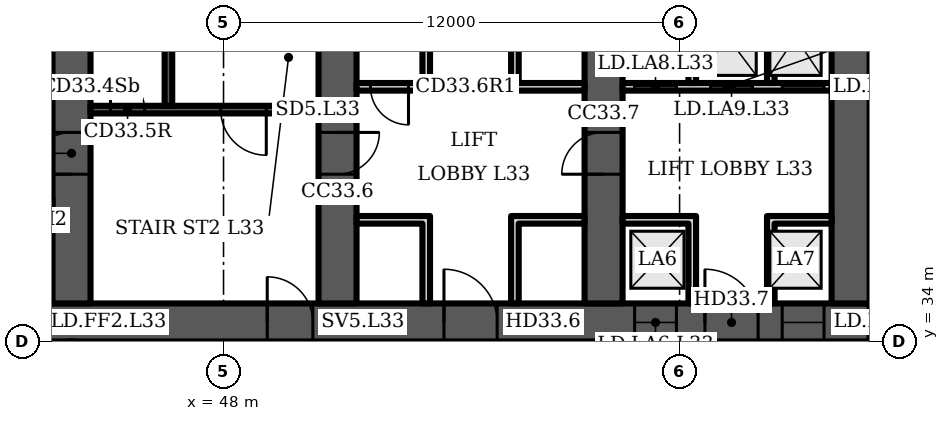
"""IFC4 building model, lengths in metres.
Left out: names, types, materials, properties, quantities, classifications, styles, units other than length and angle.
Written with IfcOpenShell. Run it as: python <this file> out.ifc"""

import sys

from ifc_helpers import new_model, si_unit, direction, frame, frame_2d, origin, place, context, subcontext, project, spatial, polyline, rectangle, outline, extrude, element, fill, save


model = new_model("IFC4")
c1 = context("Model", 3, precision=1e-05, world=origin(), true_north=direction((0.0, 1.0)))
c2 = subcontext(c1, "Body", "Model", "MODEL_VIEW")
j1 = project(units=[si_unit("LENGTHUNIT", "METRE"), si_unit("PLANEANGLEUNIT", "RADIAN")], contexts=[c1])
p1 = place(None, origin())
s1 = spatial("IfcSite", under=j1, at=p1, CompositionType="ELEMENT")
p2 = place(p1, origin())
s2 = spatial("IfcBuilding", under=s1, at=p2, CompositionType="ELEMENT")
p3 = place(p2, frame((0.0, 0.0, 139.9)))
s3 = spatial("IfcBuildingStorey", under=s2, at=p3, CompositionType="ELEMENT", Elevation=139.9)
p4 = place(p3, frame((16.0, 34.5, 0.0), z_axis=(0.0, 0.0, 1.0), x_axis=(1.0, 0.0, 0.0)))
e1 = element("IfcWall", 1, at=p4, inside=s3, PredefinedType="SHEAR", context=c2, shape_type="SweptSolid", body=[
    extrude(rectangle(XDim=49.0, YDim=1.0, at=frame_2d((24.5, 0.0))), origin(), (0.0, 0.0, 1.0), 3.6),
])
p5 = place(p4, frame((1.2, 0.0, 0.0)))
e2 = element("IfcOpeningElement", 2, at=p5, cuts=e1, PredefinedType="OPENING", context=c2, shape_type="SweptSolid", body=[
    extrude(rectangle(XDim=1.1, YDim=2.1, at=frame_2d((0.55, 1.05))), frame((0.0, 0.51, 0.0), z_axis=(0.0, -1.0, 0.0), x_axis=(1.0, 0.0, 0.0)), (0.0, 0.0, 1.0), 1.02),
])
p6 = place(p4, frame((5.083, 0.0, 0.0)))
e3 = element("IfcOpeningElement", 3, at=p6, cuts=e1, PredefinedType="OPENING", context=c2, shape_type="SweptSolid", body=[
    extrude(rectangle(XDim=1.1, YDim=2.1, at=frame_2d((0.55, 1.05))), frame((0.0, 0.51, 0.0), z_axis=(0.0, -1.0, 0.0), x_axis=(1.0, 0.0, 0.0)), (0.0, 0.0, 1.0), 1.02),
])
p7 = place(p4, frame((2.933, 0.0, 0.0)))
e4 = element("IfcOpeningElement", 4, at=p7, cuts=e1, PredefinedType="OPENING", context=c2, shape_type="SweptSolid", body=[
    extrude(rectangle(XDim=1.4, YDim=2.1, at=frame_2d((0.7, 1.05))), frame((0.0, 0.51, 0.0), z_axis=(0.0, -1.0, 0.0), x_axis=(1.0, 0.0, 0.0)), (0.0, 0.0, 1.0), 1.02),
])
p8 = place(p4, frame((7.65, 0.0, 0.0)))
e5 = element("IfcOpeningElement", 5, at=p8, cuts=e1, PredefinedType="OPENING", context=c2, shape_type="SweptSolid", body=[
    extrude(rectangle(XDim=1.2, YDim=2.1, at=frame_2d((0.6, 1.05))), frame((0.0, 0.51, 0.0), z_axis=(0.0, -1.0, 0.0), x_axis=(1.0, 0.0, 0.0)), (0.0, 0.0, 1.0), 1.02),
])
p9 = place(p4, frame((14.817, 0.0, 0.0)))
e6 = element("IfcOpeningElement", 6, at=p9, cuts=e1, PredefinedType="OPENING", context=c2, shape_type="SweptSolid", body=[
    extrude(rectangle(XDim=1.1, YDim=2.1, at=frame_2d((0.55, 1.05))), frame((0.0, 0.51, 0.0), z_axis=(0.0, -1.0, 0.0), x_axis=(1.0, 0.0, 0.0)), (0.0, 0.0, 1.0), 1.02),
])
p10 = place(p4, frame((19.083, 0.0, 0.0)))
e7 = element("IfcOpeningElement", 7, at=p10, cuts=e1, PredefinedType="OPENING", context=c2, shape_type="SweptSolid", body=[
    extrude(rectangle(XDim=1.1, YDim=2.1, at=frame_2d((0.55, 1.05))), frame((0.0, 0.51, 0.0), z_axis=(0.0, -1.0, 0.0), x_axis=(1.0, 0.0, 0.0)), (0.0, 0.0, 1.0), 1.02),
])
p11 = place(p4, frame((16.8, 0.0, 0.0)))
e8 = element("IfcOpeningElement", 8, at=p11, cuts=e1, PredefinedType="OPENING", context=c2, shape_type="SweptSolid", body=[
    extrude(rectangle(XDim=1.4, YDim=2.1, at=frame_2d((0.7, 1.05))), frame((0.0, 0.51, 0.0), z_axis=(0.0, -1.0, 0.0), x_axis=(1.0, 0.0, 0.0)), (0.0, 0.0, 1.0), 1.02),
])
p12 = place(p4, frame((21.817, 0.0, 0.0)))
e9 = element("IfcOpeningElement", 9, at=p12, cuts=e1, PredefinedType="OPENING", context=c2, shape_type="SweptSolid", body=[
    extrude(rectangle(XDim=1.1, YDim=2.1, at=frame_2d((0.55, 1.05))), frame((0.0, 0.51, 0.0), z_axis=(0.0, -1.0, 0.0), x_axis=(1.0, 0.0, 0.0)), (0.0, 0.0, 1.0), 1.02),
])
p13 = place(p4, frame((26.083, 0.0, 0.0)))
e10 = element("IfcOpeningElement", 10, at=p13, cuts=e1, PredefinedType="OPENING", context=c2, shape_type="SweptSolid", body=[
    extrude(rectangle(XDim=1.1, YDim=2.1, at=frame_2d((0.55, 1.05))), frame((0.0, 0.51, 0.0), z_axis=(0.0, -1.0, 0.0), x_axis=(1.0, 0.0, 0.0)), (0.0, 0.0, 1.0), 1.02),
])
p14 = place(p4, frame((33.15, 0.0, 0.0)))
e11 = element("IfcOpeningElement", 11, at=p14, cuts=e1, PredefinedType="OPENING", context=c2, shape_type="SweptSolid", body=[
    extrude(rectangle(XDim=1.2, YDim=2.1, at=frame_2d((0.6, 1.05))), frame((0.0, 0.51, 0.0), z_axis=(0.0, -1.0, 0.0), x_axis=(1.0, 0.0, 0.0)), (0.0, 0.0, 1.0), 1.02),
])
p15 = place(p4, frame((37.8, 0.0, 0.0)))
e12 = element("IfcOpeningElement", 12, at=p15, cuts=e1, PredefinedType="OPENING", context=c2, shape_type="SweptSolid", body=[
    extrude(rectangle(XDim=1.4, YDim=2.1, at=frame_2d((0.7, 1.05))), frame((0.0, 0.51, 0.0), z_axis=(0.0, -1.0, 0.0), x_axis=(1.0, 0.0, 0.0)), (0.0, 0.0, 1.0), 1.02),
])
p16 = place(p4, frame((42.817, 0.0, 0.0)))
e13 = element("IfcOpeningElement", 13, at=p16, cuts=e1, PredefinedType="OPENING", context=c2, shape_type="SweptSolid", body=[
    extrude(rectangle(XDim=1.1, YDim=2.1, at=frame_2d((0.55, 1.05))), frame((0.0, 0.51, 0.0), z_axis=(0.0, -1.0, 0.0), x_axis=(1.0, 0.0, 0.0)), (0.0, 0.0, 1.0), 1.02),
])
p17 = place(p4, frame((46.7, 0.0, 0.0)))
e14 = element("IfcOpeningElement", 14, at=p17, cuts=e1, PredefinedType="OPENING", context=c2, shape_type="SweptSolid", body=[
    extrude(rectangle(XDim=1.1, YDim=2.1, at=frame_2d((0.55, 1.05))), frame((0.0, 0.51, 0.0), z_axis=(0.0, -1.0, 0.0), x_axis=(1.0, 0.0, 0.0)), (0.0, 0.0, 1.0), 1.02),
])
p18 = place(p4, frame((44.667, 0.0, 0.0)))
e15 = element("IfcOpeningElement", 15, at=p18, cuts=e1, PredefinedType="OPENING", context=c2, shape_type="SweptSolid", body=[
    extrude(rectangle(XDim=1.4, YDim=2.1, at=frame_2d((0.7, 1.05))), frame((0.0, 0.51, 0.0), z_axis=(0.0, -1.0, 0.0), x_axis=(1.0, 0.0, 0.0)), (0.0, 0.0, 1.0), 1.02),
])
p19 = place(p3, frame((44.0, 35.0, 0.0), z_axis=(0.0, 0.0, 1.0), x_axis=(0.0, 1.0, 0.0)))
e16 = element("IfcWall", 16, at=p19, inside=s3, PredefinedType="SHEAR", context=c2, shape_type="SweptSolid", body=[
    extrude(rectangle(XDim=14.577, YDim=1.0, at=frame_2d((7.289, 0.0))), origin(), (0.0, 0.0, 1.0), 3.6),
])
p20 = place(p19, frame((3.4, 0.0, 0.0)))
e17 = element("IfcOpeningElement", 17, at=p20, cuts=e16, PredefinedType="OPENING", context=c2, shape_type="SweptSolid", body=[
    extrude(rectangle(XDim=1.1, YDim=2.1, at=frame_2d((0.55, 1.05))), frame((0.0, 0.51, 0.0), z_axis=(0.0, -1.0, 0.0), x_axis=(1.0, 0.0, 0.0)), (0.0, 0.0, 1.0), 1.02),
])
p21 = place(p19, frame((9.8, 0.0, 0.0)))
e18 = element("IfcOpeningElement", 18, at=p21, cuts=e16, PredefinedType="OPENING", context=c2, shape_type="SweptSolid", body=[
    extrude(rectangle(XDim=1.0, YDim=2.1, at=frame_2d((0.5, 1.05))), frame((0.0, 0.51, 0.0), z_axis=(0.0, -1.0, 0.0), x_axis=(1.0, 0.0, 0.0)), (0.0, 0.0, 1.0), 1.02),
])
p22 = place(p3, frame((51.0, 35.0, 0.0), z_axis=(0.0, 0.0, 1.0), x_axis=(0.0, 1.0, 0.0)))
e19 = element("IfcWall", 19, at=p22, inside=s3, PredefinedType="SHEAR", context=c2, shape_type="SweptSolid", body=[
    extrude(rectangle(XDim=13.965, YDim=1.0, at=frame_2d((6.982, 0.0))), origin(), (0.0, 0.0, 1.0), 3.6),
])
p23 = place(p22, frame((3.4, 0.0, 0.0)))
e20 = element("IfcOpeningElement", 20, at=p23, cuts=e19, PredefinedType="OPENING", context=c2, shape_type="SweptSolid", body=[
    extrude(rectangle(XDim=1.1, YDim=2.1, at=frame_2d((0.55, 1.05))), frame((0.0, 0.51, 0.0), z_axis=(0.0, -1.0, 0.0), x_axis=(1.0, 0.0, 0.0)), (0.0, 0.0, 1.0), 1.02),
])
p24 = place(p3, frame((58.0, 35.0, 0.0), z_axis=(0.0, 0.0, 1.0), x_axis=(0.0, 1.0, 0.0)))
e21 = element("IfcWall", 21, at=p24, inside=s3, PredefinedType="SHEAR", context=c2, shape_type="SweptSolid", body=[
    extrude(rectangle(XDim=13.352, YDim=1.0, at=frame_2d((6.676, 0.0))), origin(), (0.0, 0.0, 1.0), 3.6),
])
p25 = place(p24, frame((10.426, 0.0, 0.0)))
e22 = element("IfcOpeningElement", 22, at=p25, cuts=e21, PredefinedType="OPENING", context=c2, shape_type="SweptSolid", body=[
    extrude(rectangle(XDim=1.0, YDim=2.1, at=frame_2d((0.5, 1.05))), frame((0.0, 0.51, 0.0), z_axis=(0.0, -1.0, 0.0), x_axis=(1.0, 0.0, 0.0)), (0.0, 0.0, 1.0), 1.02),
])
p26 = place(p24, frame((3.4, 0.0, 0.0)))
e23 = element("IfcOpeningElement", 23, at=p26, cuts=e21, PredefinedType="OPENING", context=c2, shape_type="SweptSolid", body=[
    extrude(rectangle(XDim=1.1, YDim=2.1, at=frame_2d((0.55, 1.05))), frame((0.0, 0.51, 0.0), z_axis=(0.0, -1.0, 0.0), x_axis=(1.0, 0.0, 0.0)), (0.0, 0.0, 1.0), 1.02),
])
p27 = place(p3, frame((64.5, 35.0, 0.0), z_axis=(0.0, 0.0, 1.0), x_axis=(0.0, 1.0, 0.0)))
e24 = element("IfcWall", 24, at=p27, inside=s3, PredefinedType="SHEAR", context=c2, shape_type="SweptSolid", body=[
    extrude(rectangle(XDim=12.784, YDim=1.0, at=frame_2d((6.392, 0.0))), origin(), (0.0, 0.0, 1.0), 3.6),
])
p28 = place(p3, frame((44.5, 40.1, 0.0), z_axis=(0.0, 0.0, 1.0), x_axis=(1.0, 0.0, 0.0)))
e25 = element("IfcWall", 25, at=p28, inside=s3, PredefinedType="SHEAR", context=c2, shape_type="SweptSolid", body=[
    extrude(rectangle(XDim=6.0, YDim=0.2, at=frame_2d((3.0, 0.0))), origin(), (0.0, 0.0, 1.0), 3.2),
])
p29 = place(p28, frame((3.425, 0.0, 0.0)))
e26 = element("IfcOpeningElement", 26, at=p29, cuts=e25, PredefinedType="OPENING", context=c2, shape_type="SweptSolid", body=[
    extrude(rectangle(XDim=1.2, YDim=2.1, at=frame_2d((0.6, 1.05))), frame((0.0, 0.11, 0.0), z_axis=(0.0, -1.0, 0.0), x_axis=(1.0, 0.0, 0.0)), (0.0, 0.0, 1.0), 0.22),
])
p30 = place(p28, frame((0.525, 0.0, 0.0)))
e27 = element("IfcOpeningElement", 27, at=p30, cuts=e25, PredefinedType="OPENING", context=c2, shape_type="SweptSolid", body=[
    extrude(rectangle(XDim=0.9, YDim=2.1, at=frame_2d((0.45, 1.05))), frame((0.0, 0.11, 0.0), z_axis=(0.0, -1.0, 0.0), x_axis=(1.0, 0.0, 0.0)), (0.0, 0.0, 1.0), 0.22),
])
p31 = place(p3, frame((46.55, 40.2, 0.0), z_axis=(0.0, 0.0, 1.0), x_axis=(0.0, 1.0, 0.0)))
e28 = element("IfcWall", 28, at=p31, inside=s3, PredefinedType="SHEAR", context=c2, shape_type="SweptSolid", body=[
    extrude(rectangle(XDim=7.2, YDim=0.2, at=frame_2d((3.6, 0.0))), origin(), (0.0, 0.0, 1.0), 3.2),
])
p32 = place(p3, frame((51.5, 40.7, 0.0), z_axis=(0.0, 0.0, 1.0), x_axis=(1.0, 0.0, 0.0)))
e29 = element("IfcWall", 29, at=p32, inside=s3, PredefinedType="PARTITIONING", context=c2, shape_type="SweptSolid", body=[
    extrude(rectangle(XDim=6.0, YDim=0.2, at=frame_2d((3.0, 0.0))), origin(), (0.0, 0.0, 1.0), 3.2),
])
p33 = place(p32, frame((0.367, 0.0, 0.0)))
e30 = element("IfcOpeningElement", 30, at=p33, cuts=e29, PredefinedType="OPENING", context=c2, shape_type="SweptSolid", body=[
    extrude(rectangle(XDim=1.0, YDim=2.1, at=frame_2d((0.5, 1.05))), frame((0.0, 0.11, 0.0), z_axis=(0.0, -1.0, 0.0), x_axis=(1.0, 0.0, 0.0)), (0.0, 0.0, 1.0), 0.22),
])
p34 = place(p3, origin())
e31 = element("IfcWall", 31, at=p34, inside=s3, PredefinedType="PARTITIONING", context=c2, shape_type="SweptSolid", body=[
    extrude(outline(polyline([(53.233, 37.1), (51.5, 37.1), (51.5, 37.3), (53.233, 37.3), (53.433, 37.3), (53.433, 35.0), (53.233, 35.0), (53.233, 37.1)])), origin(), (0.0, 0.0, 1.0), 3.2),
])
p35 = place(p3, origin())
e32 = element("IfcWall", 32, at=p35, inside=s3, PredefinedType="PARTITIONING", context=c2, shape_type="SweptSolid", body=[
    extrude(outline(polyline([(55.567, 37.3), (55.767, 37.3), (57.5, 37.3), (57.5, 37.1), (55.767, 37.1), (55.767, 35.0), (55.567, 35.0), (55.567, 37.3)])), origin(), (0.0, 0.0, 1.0), 3.2),
])
p36 = place(p3, origin())
e33 = element("IfcWall", 33, at=p36, inside=s3, PredefinedType="PARTITIONING", context=c2, shape_type="SweptSolid", body=[
    extrude(outline(polyline([(53.233, 40.8), (53.233, 43.8), (53.433, 43.8), (53.433, 40.8), (53.233, 40.8)])), origin(), (0.0, 0.0, 1.0), 3.2),
])
p37 = place(p3, origin())
e34 = element("IfcWall", 34, at=p37, inside=s3, PredefinedType="PARTITIONING", context=c2, shape_type="SweptSolid", body=[
    extrude(outline(polyline([(55.567, 40.8), (55.567, 43.8), (55.767, 43.8), (55.767, 40.8), (55.567, 40.8)])), origin(), (0.0, 0.0, 1.0), 3.2),
])
p38 = place(p3, frame((58.5, 40.7, 0.0), z_axis=(0.0, 0.0, 1.0), x_axis=(1.0, 0.0, 0.0)))
e35 = element("IfcWall", 35, at=p38, inside=s3, PredefinedType="PARTITIONING", context=c2, shape_type="SweptSolid", body=[
    extrude(rectangle(XDim=5.5, YDim=0.2, at=frame_2d((2.75, 0.0))), origin(), (0.0, 0.0, 1.0), 3.2),
])
p39 = place(p38, frame((0.317, 0.0, 0.0)))
e36 = element("IfcOpeningElement", 36, at=p39, cuts=e35, PredefinedType="OPENING", context=c2, shape_type="SweptSolid", body=[
    extrude(rectangle(XDim=1.1, YDim=2.1, at=frame_2d((0.55, 1.05))), frame((0.0, 0.11, 0.0), z_axis=(0.0, -1.0, 0.0), x_axis=(1.0, 0.0, 0.0)), (0.0, 0.0, 1.0), 0.22),
])
p40 = place(p38, frame((2.317, 0.0, 0.0)))
e37 = element("IfcOpeningElement", 37, at=p40, cuts=e35, PredefinedType="OPENING", context=c2, shape_type="SweptSolid", body=[
    extrude(rectangle(XDim=1.1, YDim=2.1, at=frame_2d((0.55, 1.05))), frame((0.0, 0.11, 0.0), z_axis=(0.0, -1.0, 0.0), x_axis=(1.0, 0.0, 0.0)), (0.0, 0.0, 1.0), 0.22),
])
p41 = place(p38, frame((4.2, 0.0, 0.0)))
e38 = element("IfcOpeningElement", 38, at=p41, cuts=e35, PredefinedType="OPENING", context=c2, shape_type="SweptSolid", body=[
    extrude(rectangle(XDim=1.1, YDim=2.1, at=frame_2d((0.55, 1.05))), frame((0.0, 0.11, 0.0), z_axis=(0.0, -1.0, 0.0), x_axis=(1.0, 0.0, 0.0)), (0.0, 0.0, 1.0), 0.22),
])
p42 = place(p3, origin())
e39 = element("IfcWall", 39, at=p42, inside=s3, PredefinedType="PARTITIONING", context=c2, shape_type="SweptSolid", body=[
    extrude(outline(polyline([(60.233, 37.1), (58.5, 37.1), (58.5, 37.3), (60.233, 37.3), (60.433, 37.3), (60.433, 35.0), (60.233, 35.0), (60.233, 37.1)])), origin(), (0.0, 0.0, 1.0), 3.2),
])
p43 = place(p3, origin())
e40 = element("IfcWall", 40, at=p43, inside=s3, PredefinedType="PARTITIONING", context=c2, shape_type="SweptSolid", body=[
    extrude(outline(polyline([(62.3, 37.3), (62.5, 37.3), (64.0, 37.3), (64.0, 37.1), (62.5, 37.1), (62.5, 35.0), (62.3, 35.0), (62.3, 37.3)])), origin(), (0.0, 0.0, 1.0), 3.2),
])
p44 = place(p3, origin())
e41 = element("IfcWall", 41, at=p44, inside=s3, PredefinedType="PARTITIONING", context=c2, shape_type="SweptSolid", body=[
    extrude(outline(polyline([(60.433, 40.8), (60.233, 40.8), (60.233, 43.8), (58.5, 43.8), (58.5, 44.0), (64.0, 44.0), (64.0, 43.8), (62.5, 43.8), (62.5, 40.8), (62.3, 40.8), (62.3, 43.8), (60.433, 43.8), (60.433, 40.8)])), origin(), (0.0, 0.0, 1.0), 3.2),
])
p45 = place(p29, origin())
e42 = element("IfcDoor", 42, at=p45, inside=s3, OperationType="SINGLE_SWING_RIGHT", PredefinedType="DOOR", context=c2, shape_type="SweptSolid", body=[
    extrude(rectangle(XDim=1.2, YDim=2.1, at=frame_2d((0.6, 1.05))), frame((0.0, 0.025, 0.0), z_axis=(0.0, -1.0, 0.0), x_axis=(1.0, 0.0, 0.0)), (0.0, 0.0, 1.0), 0.05),
])
fill(e26, e42)
p46 = place(p30, origin())
e43 = element("IfcDoor", 43, at=p46, inside=s3, OperationType="SINGLE_SWING_LEFT", PredefinedType="DOOR", context=c2, shape_type="SweptSolid", body=[
    extrude(rectangle(XDim=0.9, YDim=2.1, at=frame_2d((0.45, 1.05))), frame((0.0, 0.025, 0.0), z_axis=(0.0, -1.0, 0.0), x_axis=(1.0, 0.0, 0.0)), (0.0, 0.0, 1.0), 0.05),
])
fill(e27, e43)
p47 = place(p14, origin())
e44 = element("IfcDoor", 44, at=p47, inside=s3, OperationType="SINGLE_SWING_LEFT", PredefinedType="DOOR", context=c2, shape_type="SweptSolid", body=[
    extrude(rectangle(XDim=1.2, YDim=2.1, at=frame_2d((0.6, 1.05))), frame((0.0, 0.025, 0.0), z_axis=(0.0, -1.0, 0.0), x_axis=(1.0, 0.0, 0.0)), (0.0, 0.0, 1.0), 0.05),
])
fill(e11, e44)
p48 = place(p15, origin())
e45 = element("IfcDoor", 45, at=p48, inside=s3, OperationType="DOUBLE_DOOR_SINGLE_SWING", PredefinedType="DOOR", context=c2, shape_type="SweptSolid", body=[
    extrude(rectangle(XDim=1.4, YDim=2.1, at=frame_2d((0.7, 1.05))), frame((0.0, 0.025, 0.0), z_axis=(0.0, -1.0, 0.0), x_axis=(1.0, 0.0, 0.0)), (0.0, 0.0, 1.0), 0.05),
])
fill(e12, e45)
p49 = place(p33, origin())
e46 = element("IfcDoor", 46, at=p49, inside=s3, OperationType="SINGLE_SWING_RIGHT", PredefinedType="DOOR", context=c2, shape_type="SweptSolid", body=[
    extrude(rectangle(XDim=1.0, YDim=2.1, at=frame_2d((0.5, 1.05))), frame((0.0, 0.025, 0.0), z_axis=(0.0, -1.0, 0.0), x_axis=(1.0, 0.0, 0.0)), (0.0, 0.0, 1.0), 0.05),
])
fill(e30, e46)
p50 = place(p16, origin())
e47 = element("IfcDoor", 47, at=p50, inside=s3, OperationType="DOUBLE_DOOR_SLIDING", PredefinedType="DOOR", context=c2, shape_type="SweptSolid", body=[
    extrude(rectangle(XDim=1.1, YDim=2.1, at=frame_2d((0.55, 1.05))), frame((0.0, 0.025, 0.0), z_axis=(0.0, -1.0, 0.0), x_axis=(1.0, 0.0, 0.0)), (0.0, 0.0, 1.0), 0.05),
])
fill(e13, e47)
p51 = place(p17, origin())
e48 = element("IfcDoor", 48, at=p51, inside=s3, OperationType="DOUBLE_DOOR_SLIDING", PredefinedType="DOOR", context=c2, shape_type="SweptSolid", body=[
    extrude(rectangle(XDim=1.1, YDim=2.1, at=frame_2d((0.55, 1.05))), frame((0.0, 0.025, 0.0), z_axis=(0.0, -1.0, 0.0), x_axis=(1.0, 0.0, 0.0)), (0.0, 0.0, 1.0), 0.05),
])
fill(e14, e48)
p52 = place(p18, origin())
e49 = element("IfcDoor", 49, at=p52, inside=s3, OperationType="DOUBLE_DOOR_SINGLE_SWING", PredefinedType="DOOR", context=c2, shape_type="SweptSolid", body=[
    extrude(rectangle(XDim=1.4, YDim=2.1, at=frame_2d((0.7, 1.05))), frame((0.0, 0.025, 0.0), z_axis=(0.0, -1.0, 0.0), x_axis=(1.0, 0.0, 0.0)), (0.0, 0.0, 1.0), 0.05),
])
fill(e15, e49)
p53 = place(p39, origin())
e50 = element("IfcDoor", 50, at=p53, inside=s3, OperationType="DOUBLE_DOOR_SLIDING", PredefinedType="DOOR", context=c2, shape_type="SweptSolid", body=[
    extrude(rectangle(XDim=1.1, YDim=2.1, at=frame_2d((0.55, 1.05))), frame((0.0, 0.025, 0.0), z_axis=(0.0, -1.0, 0.0), x_axis=(1.0, 0.0, 0.0)), (0.0, 0.0, 1.0), 0.05),
])
fill(e36, e50)
p54 = place(p40, origin())
e51 = element("IfcDoor", 51, at=p54, inside=s3, OperationType="DOUBLE_DOOR_SLIDING", PredefinedType="DOOR", context=c2, shape_type="SweptSolid", body=[
    extrude(rectangle(XDim=1.1, YDim=2.1, at=frame_2d((0.55, 1.05))), frame((0.0, 0.025, 0.0), z_axis=(0.0, -1.0, 0.0), x_axis=(1.0, 0.0, 0.0)), (0.0, 0.0, 1.0), 0.05),
])
fill(e37, e51)
p55 = place(p41, origin())
e52 = element("IfcDoor", 52, at=p55, inside=s3, OperationType="DOUBLE_DOOR_SLIDING", PredefinedType="DOOR", context=c2, shape_type="SweptSolid", body=[
    extrude(rectangle(XDim=1.1, YDim=2.1, at=frame_2d((0.55, 1.05))), frame((0.0, 0.025, 0.0), z_axis=(0.0, -1.0, 0.0), x_axis=(1.0, 0.0, 0.0)), (0.0, 0.0, 1.0), 0.05),
])
fill(e38, e52)
p56 = place(p20, origin())
e53 = element("IfcDoor", 53, at=p56, inside=s3, OperationType="SINGLE_SWING_LEFT", PredefinedType="DOOR", context=c2, shape_type="SweptSolid", body=[
    extrude(rectangle(XDim=1.1, YDim=2.1, at=frame_2d((0.55, 1.05))), frame((0.0, 0.025, 0.0), z_axis=(0.0, -1.0, 0.0), x_axis=(1.0, 0.0, 0.0)), (0.0, 0.0, 1.0), 0.05),
])
fill(e17, e53)
p57 = place(p23, origin())
e54 = element("IfcDoor", 54, at=p57, inside=s3, OperationType="SINGLE_SWING_RIGHT", PredefinedType="DOOR", context=c2, shape_type="SweptSolid", body=[
    extrude(rectangle(XDim=1.1, YDim=2.1, at=frame_2d((0.55, 1.05))), frame((0.0, 0.025, 0.0), z_axis=(0.0, -1.0, 0.0), x_axis=(1.0, 0.0, 0.0)), (0.0, 0.0, 1.0), 0.05),
])
fill(e20, e54)
p58 = place(p26, origin())
e55 = element("IfcDoor", 55, at=p58, inside=s3, OperationType="SINGLE_SWING_LEFT", PredefinedType="DOOR", context=c2, shape_type="SweptSolid", body=[
    extrude(rectangle(XDim=1.1, YDim=2.1, at=frame_2d((0.55, 1.05))), frame((0.0, 0.025, 0.0), z_axis=(0.0, -1.0, 0.0), x_axis=(1.0, 0.0, 0.0)), (0.0, 0.0, 1.0), 0.05),
])
fill(e23, e55)
save(model, sys.argv[1])
